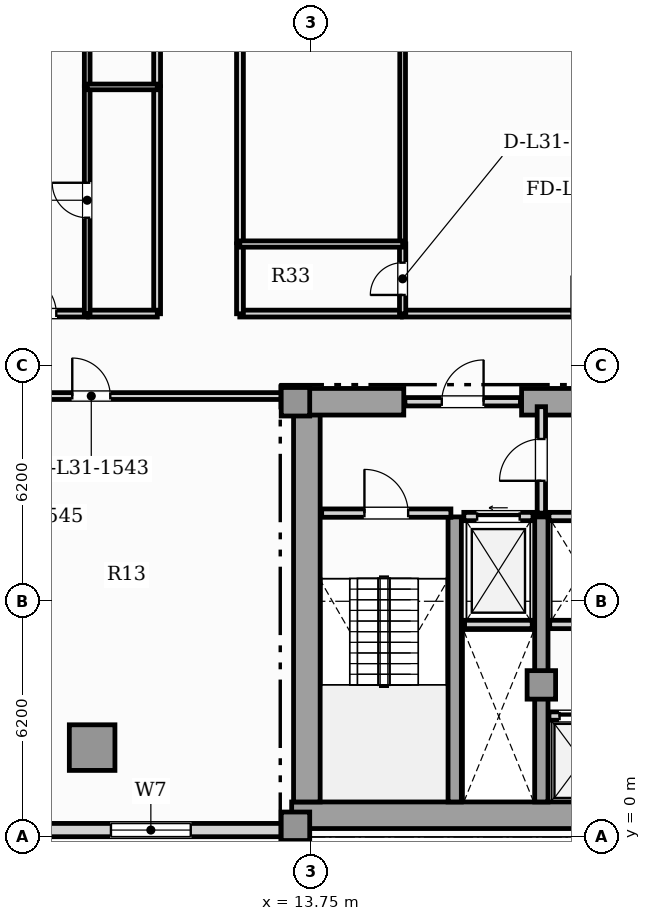
"""IFC4 building model, lengths in metres.
Left out: names, types, materials, properties, quantities, classifications, styles, units other than length and angle.
Written with IfcOpenShell. Run it as: python <this file> out.ifc"""

import sys

from ifc_helpers import new_model, si_unit, direction, frame, frame_2d, origin, origin_2d, place, context, subcontext, project, spatial, rectangle, hollow_rectangle, extrude, element, fill, save


model = new_model("IFC4")
c1 = context("Model", 3, precision=1e-05, world=origin(), true_north=direction((0.0, 1.0)))
c2 = subcontext(c1, "Body", "Model", "MODEL_VIEW")
j1 = project(units=[si_unit("LENGTHUNIT", "METRE"), si_unit("PLANEANGLEUNIT", "RADIAN")], contexts=[c1])
p1 = place(None, origin())
s1 = spatial("IfcSite", under=j1, at=p1, CompositionType="ELEMENT")
p2 = place(p1, origin())
s2 = spatial("IfcBuilding", under=s1, at=p2, CompositionType="ELEMENT")
p3 = place(p2, frame((0.0, 0.0, 127.25)))
s3 = spatial("IfcBuildingStorey", under=s2, at=p3, CompositionType="ELEMENT", Elevation=127.25)
p4 = place(p3, frame((13.25, 0.57, 0.0), z_axis=(0.0, 0.0, 1.0), x_axis=(1.0, 0.0, 0.0)))
e1 = element("IfcWall", 1, at=p4, inside=s3, PredefinedType="SHEAR", context=c2, shape_type="SweptSolid", body=[
    extrude(rectangle(XDim=31.0, YDim=0.7, at=frame_2d((15.5, 0.0))), origin(), (0.0, 0.0, 1.0), 3.6),
])
p5 = place(p3, frame((13.65, 0.92, 0.0), z_axis=(0.0, 0.0, 1.0), x_axis=(0.0, 1.0, 0.0)))
e2 = element("IfcWall", 2, at=p5, inside=s3, PredefinedType="SHEAR", context=c2, shape_type="SweptSolid", body=[
    extrude(rectangle(XDim=10.53, YDim=0.7, at=frame_2d((5.265, 0.0))), origin(), (0.0, 0.0, 1.0), 3.6),
])
p6 = place(p3, frame((13.25, 11.45, 0.0), z_axis=(0.0, 0.0, 1.0), x_axis=(1.0, 0.0, 0.0)))
e3 = element("IfcWall", 3, at=p6, inside=s3, PredefinedType="SHEAR", context=c2, shape_type="SweptSolid", body=[
    extrude(rectangle(XDim=2.95, YDim=0.7, at=frame_2d((1.475, 0.0))), origin(), (0.0, 0.0, 1.0), 3.6),
])
p7 = place(p3, frame((19.3, 11.45, 0.0), z_axis=(0.0, 0.0, 1.0), x_axis=(1.0, 0.0, 0.0)))
e4 = element("IfcWall", 4, at=p7, inside=s3, PredefinedType="SHEAR", context=c2, shape_type="SweptSolid", body=[
    extrude(rectangle(XDim=7.3, YDim=0.7, at=frame_2d((3.65, 0.0))), origin(), (0.0, 0.0, 1.0), 3.6),
])
for number, where, z_axis, x_axis in (
    (5, (17.54, 0.92, 0.0), (0.0, 0.0, 1.0), (0.0, 1.0, 0.0)),
    (6, (19.82, 0.92, 0.0), (0.0, 0.0, 1.0), (0.0, 1.0, 0.0)),
):
    element("IfcWall", number, at=place(p3, frame(where, z_axis=z_axis, x_axis=x_axis)), inside=s3, PredefinedType="SHEAR", context=c2, shape_type="SweptSolid", body=[
        extrude(rectangle(XDim=7.5, YDim=0.35, at=frame_2d((3.75, 0.0))), origin(), (0.0, 0.0, 1.0), 3.6),
    ])
for number, where, z_axis, x_axis in (
    (7, (13.35, 0.28, 0.0), (0.0, 0.0, 1.0), (1.0, 0.0, 0.0)),
    (8, (13.35, 11.45, 0.0), (0.0, 0.0, 1.0), (1.0, 0.0, 0.0)),
    (9, (19.82, 4.0, 0.0), (0.0, 0.0, 1.0), (1.0, 0.0, 0.0)),
):
    element("IfcColumn", number, at=place(p3, frame(where, z_axis=z_axis, x_axis=x_axis)), inside=s3, PredefinedType="COLUMN", context=c2, shape_type="SweptSolid", body=[
        extrude(rectangle(XDim=0.75, YDim=0.75, at=origin_2d()), origin(), (0.0, 0.0, 1.0), 3.85),
    ])
p8 = place(p3, frame((8.0, 2.35, 0.0), z_axis=(0.0, 0.0, 1.0), x_axis=(1.0, 0.0, 0.0)))
e10 = element("IfcColumn", 10, at=p8, inside=s3, PredefinedType="USERDEFINED", context=c2, shape_type="SweptSolid", body=[
    extrude(hollow_rectangle(XDim=1.2, YDim=1.2, WallThickness=0.07, at=origin_2d()), origin(), (0.0, 0.0, 1.0), 3.85),
])
p9 = place(p3, frame((5.84, 0.18, 0.0), z_axis=(0.0, 0.0, 1.0), x_axis=(1.0, 0.0, 0.0)))
e11 = element("IfcWall", 11, at=p9, inside=s3, PredefinedType="SOLIDWALL", context=c2, shape_type="SweptSolid", body=[
    extrude(rectangle(XDim=7.41, YDim=0.35, at=frame_2d((3.705, 0.0))), origin(), (0.0, 0.0, 1.0), 3.6),
])
p10 = place(p9, frame((2.655, 0.0, 0.85)))
e12 = element("IfcOpeningElement", 12, at=p10, cuts=e11, PredefinedType="OPENING", context=c2, shape_type="SweptSolid", body=[
    extrude(rectangle(XDim=2.1, YDim=2.05, at=frame_2d((1.05, 1.025))), frame((0.0, 0.185, 0.0), z_axis=(0.0, -1.0, 0.0), x_axis=(1.0, 0.0, 0.0)), (0.0, 0.0, 1.0), 0.37),
])
p11 = place(p3, frame((17.8, 5.59, 0.0), z_axis=(0.0, 0.0, 1.0), x_axis=(1.0, 0.0, 0.0)))
e13 = element("IfcWall", 13, at=p11, inside=s3, PredefinedType="SOLIDWALL", context=c2, shape_type="SweptSolid", body=[
    extrude(rectangle(XDim=1.78, YDim=0.22, at=frame_2d((0.89, 0.0))), origin(), (0.0, 0.0, 1.0), 3.6),
])
p12 = place(p3, frame((17.78, 8.43, 0.0), z_axis=(0.0, 0.0, 1.0), x_axis=(1.0, 0.0, 0.0)))
e14 = element("IfcWall", 14, at=p12, inside=s3, PredefinedType="SOLIDWALL", context=c2, shape_type="SweptSolid", body=[
    extrude(rectangle(XDim=1.82, YDim=0.22, at=frame_2d((0.91, 0.0))), origin(), (0.0, 0.0, 1.0), 3.6),
])
p13 = place(p12, frame((0.35, 0.0, 0.0)))
e15 = element("IfcOpeningElement", 15, at=p13, cuts=e14, PredefinedType="OPENING", context=c2, shape_type="SweptSolid", body=[
    extrude(rectangle(XDim=1.12, YDim=2.25, at=frame_2d((0.56, 1.125))), frame((0.0, 0.12, 0.0), z_axis=(0.0, -1.0, 0.0), x_axis=(1.0, 0.0, 0.0)), (0.0, 0.0, 1.0), 0.24),
])
p14 = place(p3, frame((20.02, 3.18, 0.0), z_axis=(0.0, 0.0, 1.0), x_axis=(1.0, 0.0, 0.0)))
e16 = element("IfcWall", 16, at=p14, inside=s3, PredefinedType="SOLIDWALL", context=c2, shape_type="SweptSolid", body=[
    extrude(rectangle(XDim=1.74, YDim=0.22, at=frame_2d((0.87, 0.0))), origin(), (0.0, 0.0, 1.0), 3.6),
])
p15 = place(p14, frame((0.28, 0.0, 0.0)))
e17 = element("IfcOpeningElement", 17, at=p15, cuts=e16, PredefinedType="OPENING", context=c2, shape_type="SweptSolid", body=[
    extrude(rectangle(XDim=1.18, YDim=2.2, at=frame_2d((0.59, 1.1))), frame((0.0, 0.12, 0.0), z_axis=(0.0, -1.0, 0.0), x_axis=(1.0, 0.0, 0.0)), (0.0, 0.0, 1.0), 0.24),
])
p16 = place(p3, frame((20.04, 5.59, 0.0), z_axis=(0.0, 0.0, 1.0), x_axis=(1.0, 0.0, 0.0)))
e18 = element("IfcWall", 18, at=p16, inside=s3, PredefinedType="SOLIDWALL", context=c2, shape_type="SweptSolid", body=[
    extrude(rectangle(XDim=1.7, YDim=0.22, at=frame_2d((0.85, 0.0))), origin(), (0.0, 0.0, 1.0), 3.6),
])
p17 = place(p3, frame((20.02, 8.43, 0.0), z_axis=(0.0, 0.0, 1.0), x_axis=(1.0, 0.0, 0.0)))
e19 = element("IfcWall", 19, at=p17, inside=s3, PredefinedType="SOLIDWALL", context=c2, shape_type="SweptSolid", body=[
    extrude(rectangle(XDim=1.74, YDim=0.22, at=frame_2d((0.87, 0.0))), origin(), (0.0, 0.0, 1.0), 3.6),
])
p18 = place(p3, frame((14.04, 8.52, 0.0), z_axis=(0.0, 0.0, 1.0), x_axis=(1.0, 0.0, 0.0)))
e20 = element("IfcWall", 20, at=p18, inside=s3, PredefinedType="SOLIDWALL", context=c2, shape_type="SweptSolid", body=[
    extrude(rectangle(XDim=3.4, YDim=0.22, at=frame_2d((1.7, 0.0))), origin(), (0.0, 0.0, 1.0), 3.6),
])
p19 = place(p18, frame((1.125, 0.0, 0.0)))
e21 = element("IfcOpeningElement", 21, at=p19, cuts=e20, PredefinedType="OPENING", context=c2, shape_type="SweptSolid", body=[
    extrude(rectangle(XDim=1.15, YDim=2.2, at=frame_2d((0.575, 1.1))), frame((0.0, 0.12, 0.0), z_axis=(0.0, -1.0, 0.0), x_axis=(1.0, 0.0, 0.0)), (0.0, 0.0, 1.0), 0.24),
])
p20 = place(p3, frame((19.82, 8.52, 0.0), z_axis=(0.0, 0.0, 1.0), x_axis=(0.0, 1.0, 0.0)))
e22 = element("IfcWall", 22, at=p20, inside=s3, PredefinedType="SOLIDWALL", context=c2, shape_type="SweptSolid", body=[
    extrude(rectangle(XDim=2.8, YDim=0.22, at=frame_2d((1.4, 0.0))), origin(), (0.0, 0.0, 1.0), 3.055),
])
p21 = place(p20, frame((0.85, 0.0, 0.0)))
e23 = element("IfcOpeningElement", 23, at=p21, cuts=e22, PredefinedType="OPENING", context=c2, shape_type="SweptSolid", body=[
    extrude(rectangle(XDim=1.1, YDim=2.2, at=frame_2d((0.55, 1.1))), frame((0.0, 0.12, 0.0), z_axis=(0.0, -1.0, 0.0), x_axis=(1.0, 0.0, 0.0)), (0.0, 0.0, 1.0), 0.24),
])
p22 = place(p3, frame((16.23, 11.45, 0.0), z_axis=(0.0, 0.0, 1.0), x_axis=(1.0, 0.0, 0.0)))
e24 = element("IfcWall", 24, at=p22, inside=s3, PredefinedType="SOLIDWALL", context=c2, shape_type="SweptSolid", body=[
    extrude(rectangle(XDim=3.04, YDim=0.22, at=frame_2d((1.52, 0.0))), origin(), (0.0, 0.0, 1.0), 3.6),
])
p23 = place(p22, frame((0.97, 0.0, 0.0)))
e25 = element("IfcOpeningElement", 25, at=p23, cuts=e24, PredefinedType="OPENING", context=c2, shape_type="SweptSolid", body=[
    extrude(rectangle(XDim=1.1, YDim=2.2, at=frame_2d((0.55, 1.1))), frame((0.0, 0.12, 0.0), z_axis=(0.0, -1.0, 0.0), x_axis=(1.0, 0.0, 0.0)), (0.0, 0.0, 1.0), 0.24),
])
p24 = place(p3, frame((2.81, 11.6, 0.0), z_axis=(0.0, 0.0, 1.0), x_axis=(1.0, 0.0, 0.0)))
e26 = element("IfcWall", 26, at=p24, inside=s3, PredefinedType="PARTITIONING", context=c2, shape_type="SweptSolid", body=[
    extrude(rectangle(XDim=10.335, YDim=0.18, at=frame_2d((5.167, 0.0))), origin(), (0.0, 0.0, 1.0), 3.6),
])
p25 = place(p24, frame((4.667, 0.0, 0.0)))
e27 = element("IfcOpeningElement", 27, at=p25, cuts=e26, PredefinedType="OPENING", context=c2, shape_type="SweptSolid", body=[
    extrude(rectangle(XDim=1.0, YDim=2.15, at=frame_2d((0.5, 1.075))), frame((0.0, 0.1, 0.0), z_axis=(0.0, -1.0, 0.0), x_axis=(1.0, 0.0, 0.0)), (0.0, 0.0, 1.0), 0.2),
])
p26 = place(p3, frame((5.239, 13.77, 0.0), z_axis=(0.0, 0.0, 1.0), x_axis=(1.0, 0.0, 0.0)))
e28 = element("IfcWall", 28, at=p26, inside=s3, PredefinedType="PARTITIONING", context=c2, shape_type="SweptSolid", body=[
    extrude(rectangle(XDim=2.636, YDim=0.18, at=frame_2d((1.318, 0.0))), origin(), (0.0, 0.0, 1.0), 3.6),
])
p27 = place(p26, frame((0.818, 0.0, 0.0)))
e29 = element("IfcOpeningElement", 29, at=p27, cuts=e28, PredefinedType="OPENING", context=c2, shape_type="SweptSolid", body=[
    extrude(rectangle(XDim=1.0, YDim=2.15, at=frame_2d((0.5, 1.075))), frame((0.0, 0.1, 0.0), z_axis=(0.0, -1.0, 0.0), x_axis=(1.0, 0.0, 0.0)), (0.0, 0.0, 1.0), 0.2),
])
p28 = place(p3, frame((9.71, 13.765, 0.0), z_axis=(0.0, 0.0, 1.0), x_axis=(0.0, 1.0, 0.0)))
e30 = element("IfcWall", 30, at=p28, inside=s3, PredefinedType="PARTITIONING", context=c2, shape_type="SweptSolid", body=[
    extrude(rectangle(XDim=5.974, YDim=0.18, at=frame_2d((2.987, 0.0))), origin(), (0.0, 0.0, 1.0), 3.6),
])
p29 = place(p3, frame((7.905, 13.77, 0.0), z_axis=(0.0, 0.0, 1.0), x_axis=(1.0, 0.0, 0.0)))
e31 = element("IfcWall", 31, at=p29, inside=s3, PredefinedType="PARTITIONING", context=c2, shape_type="SweptSolid", body=[
    extrude(rectangle(XDim=1.81, YDim=0.18, at=frame_2d((0.905, 0.0))), origin(), (0.0, 0.0, 1.0), 3.6),
])
p30 = place(p3, frame((9.71, 19.769, 0.0), z_axis=(0.0, 0.0, 1.0), x_axis=(0.0, 1.0, 0.0)))
e32 = element("IfcWall", 32, at=p30, inside=s3, PredefinedType="PARTITIONING", context=c2, shape_type="SweptSolid", body=[
    extrude(rectangle(XDim=8.126, YDim=0.18, at=frame_2d((4.063, 0.0))), origin(), (0.0, 0.0, 1.0), 3.6),
])
p31 = place(p3, frame((16.165, 13.77, 0.0), z_axis=(0.0, 0.0, 1.0), x_axis=(1.0, 0.0, 0.0)))
e33 = element("IfcWall", 33, at=p31, inside=s3, PredefinedType="PARTITIONING", context=c2, shape_type="SweptSolid", body=[
    extrude(rectangle(XDim=9.9, YDim=0.18, at=frame_2d((4.95, 0.0))), origin(), (0.0, 0.0, 1.0), 3.6),
])
p32 = place(p31, frame((4.45, 0.0, 0.0)))
e34 = element("IfcOpeningElement", 34, at=p32, cuts=e33, PredefinedType="OPENING", context=c2, shape_type="SweptSolid", body=[
    extrude(rectangle(XDim=1.0, YDim=2.15, at=frame_2d((0.5, 1.075))), frame((0.0, 0.1, 0.0), z_axis=(0.0, -1.0, 0.0), x_axis=(1.0, 0.0, 0.0)), (0.0, 0.0, 1.0), 0.2),
])
p33 = place(p3, frame((11.885, 13.77, 0.0), z_axis=(0.0, 0.0, 1.0), x_axis=(1.0, 0.0, 0.0)))
e35 = element("IfcWall", 35, at=p33, inside=s3, PredefinedType="PARTITIONING", context=c2, shape_type="SweptSolid", body=[
    extrude(rectangle(XDim=4.25, YDim=0.18, at=frame_2d((2.125, 0.0))), origin(), (0.0, 0.0, 1.0), 3.6),
])
p34 = place(p3, frame((11.89, 13.765, 0.0), z_axis=(0.0, 0.0, 1.0), x_axis=(0.0, 1.0, 0.0)))
e36 = element("IfcWall", 36, at=p34, inside=s3, PredefinedType="PARTITIONING", context=c2, shape_type="SweptSolid", body=[
    extrude(rectangle(XDim=1.84, YDim=0.18, at=frame_2d((0.92, 0.0))), origin(), (0.0, 0.0, 1.0), 3.6),
])
p35 = place(p3, frame((11.89, 15.635, 0.0), z_axis=(0.0, 0.0, 1.0), x_axis=(0.0, 1.0, 0.0)))
e37 = element("IfcWall", 37, at=p35, inside=s3, PredefinedType="PARTITIONING", context=c2, shape_type="SweptSolid", body=[
    extrude(rectangle(XDim=12.26, YDim=0.18, at=frame_2d((6.13, 0.0))), origin(), (0.0, 0.0, 1.0), 3.6),
])
p36 = place(p3, frame((7.87, 13.765, 0.0), z_axis=(0.0, 0.0, 1.0), x_axis=(0.0, 1.0, 0.0)))
e38 = element("IfcWall", 38, at=p36, inside=s3, PredefinedType="PARTITIONING", context=c2, shape_type="SweptSolid", body=[
    extrude(rectangle(XDim=5.974, YDim=0.15, at=frame_2d((2.987, 0.0))), origin(), (0.0, 0.0, 1.0), 3.055),
])
p37 = place(p36, frame((2.527, 0.0, 0.0)))
e39 = element("IfcOpeningElement", 39, at=p37, cuts=e38, PredefinedType="OPENING", context=c2, shape_type="SweptSolid", body=[
    extrude(rectangle(XDim=0.92, YDim=2.1, at=frame_2d((0.46, 1.05))), frame((0.0, 0.085, 0.0), z_axis=(0.0, -1.0, 0.0), x_axis=(1.0, 0.0, 0.0)), (0.0, 0.0, 1.0), 0.17),
])
p38 = place(p3, frame((7.87, 19.769, 0.0), z_axis=(0.0, 0.0, 1.0), x_axis=(0.0, 1.0, 0.0)))
e40 = element("IfcWall", 40, at=p38, inside=s3, PredefinedType="PARTITIONING", context=c2, shape_type="SweptSolid", body=[
    extrude(rectangle(XDim=13.736, YDim=0.15, at=frame_2d((6.868, 0.0))), origin(), (0.0, 0.0, 1.0), 3.055),
])
p39 = place(p38, frame((6.408, 0.0, 0.0)))
e41 = element("IfcOpeningElement", 41, at=p39, cuts=e40, PredefinedType="OPENING", context=c2, shape_type="SweptSolid", body=[
    extrude(rectangle(XDim=0.92, YDim=2.1, at=frame_2d((0.46, 1.05))), frame((0.0, 0.085, 0.0), z_axis=(0.0, -1.0, 0.0), x_axis=(1.0, 0.0, 0.0)), (0.0, 0.0, 1.0), 0.17),
])
p40 = place(p3, frame((7.865, 19.734, 0.0), z_axis=(0.0, 0.0, 1.0), x_axis=(1.0, 0.0, 0.0)))
e42 = element("IfcWall", 42, at=p40, inside=s3, PredefinedType="PARTITIONING", context=c2, shape_type="SweptSolid", body=[
    extrude(rectangle(XDim=1.85, YDim=0.15, at=frame_2d((0.925, 0.0))), origin(), (0.0, 0.0, 1.0), 3.6),
])
p41 = place(p3, frame((16.17, 13.765, 0.0), z_axis=(0.0, 0.0, 1.0), x_axis=(0.0, 1.0, 0.0)))
e43 = element("IfcWall", 43, at=p41, inside=s3, PredefinedType="PLUMBINGWALL", context=c2, shape_type="SweptSolid", body=[
    extrude(rectangle(XDim=1.84, YDim=0.165, at=frame_2d((0.92, 0.0))), origin(), (0.0, 0.0, 1.0), 3.6),
])
p42 = place(p41, frame((0.495, 0.0, 0.0)))
e44 = element("IfcOpeningElement", 44, at=p42, cuts=e43, PredefinedType="OPENING", context=c2, shape_type="SweptSolid", body=[
    extrude(rectangle(XDim=0.85, YDim=2.1, at=frame_2d((0.425, 1.05))), frame((0.0, 0.093, 0.0), z_axis=(0.0, -1.0, 0.0), x_axis=(1.0, 0.0, 0.0)), (0.0, 0.0, 1.0), 0.185),
])
p43 = place(p3, frame((16.17, 15.635, 0.0), z_axis=(0.0, 0.0, 1.0), x_axis=(0.0, 1.0, 0.0)))
e45 = element("IfcWall", 45, at=p43, inside=s3, PredefinedType="PARTITIONING", context=c2, shape_type="SweptSolid", body=[
    extrude(rectangle(XDim=17.87, YDim=0.15, at=frame_2d((8.935, 0.0))), origin(), (0.0, 0.0, 1.0), 3.6),
])
p44 = place(p43, frame((8.475, 0.0, 0.0)))
e46 = element("IfcOpeningElement", 46, at=p44, cuts=e45, PredefinedType="OPENING", context=c2, shape_type="SweptSolid", body=[
    extrude(rectangle(XDim=0.92, YDim=2.1, at=frame_2d((0.46, 1.05))), frame((0.0, 0.085, 0.0), z_axis=(0.0, -1.0, 0.0), x_axis=(1.0, 0.0, 0.0)), (0.0, 0.0, 1.0), 0.17),
])
p45 = place(p3, frame((11.885, 15.6, 0.0), z_axis=(0.0, 0.0, 1.0), x_axis=(1.0, 0.0, 0.0)))
e47 = element("IfcWall", 47, at=p45, inside=s3, PredefinedType="PLUMBINGWALL", context=c2, shape_type="SweptSolid", body=[
    extrude(rectangle(XDim=4.29, YDim=0.165, at=frame_2d((2.145, 0.0))), origin(), (0.0, 0.0, 1.0), 3.6),
])
p46 = place(p10, origin())
e48 = element("IfcWindow", 48, at=p46, inside=s3, PartitioningType="SINGLE_PANEL", PredefinedType="WINDOW", context=c2, shape_type="SweptSolid", body=[
    extrude(rectangle(XDim=2.1, YDim=2.05, at=frame_2d((1.05, 1.025))), frame((0.0, 0.03, 0.0), z_axis=(0.0, -1.0, 0.0), x_axis=(1.0, 0.0, 0.0)), (0.0, 0.0, 1.0), 0.06),
])
fill(e12, e48)
p47 = place(p13, origin())
e49 = element("IfcDoor", 49, at=p47, inside=s3, OperationType="SLIDING_TO_LEFT", PredefinedType="DOOR", context=c2, shape_type="SweptSolid", body=[
    extrude(rectangle(XDim=1.12, YDim=2.25, at=frame_2d((0.56, 1.125))), frame((0.0, 0.025, 0.0), z_axis=(0.0, -1.0, 0.0), x_axis=(1.0, 0.0, 0.0)), (0.0, 0.0, 1.0), 0.05),
])
fill(e15, e49)
p48 = place(p15, origin())
e50 = element("IfcDoor", 50, at=p48, inside=s3, OperationType="SLIDING_TO_RIGHT", PredefinedType="DOOR", context=c2, shape_type="SweptSolid", body=[
    extrude(rectangle(XDim=1.18, YDim=2.2, at=frame_2d((0.59, 1.1))), frame((0.0, 0.025, 0.0), z_axis=(0.0, -1.0, 0.0), x_axis=(1.0, 0.0, 0.0)), (0.0, 0.0, 1.0), 0.05),
])
fill(e17, e50)
p49 = place(p19, origin())
e51 = element("IfcDoor", 51, at=p49, inside=s3, OperationType="SINGLE_SWING_LEFT", PredefinedType="DOOR", context=c2, shape_type="SweptSolid", body=[
    extrude(rectangle(XDim=1.15, YDim=2.2, at=frame_2d((0.575, 1.1))), frame((0.0, 0.025, 0.0), z_axis=(0.0, -1.0, 0.0), x_axis=(1.0, 0.0, 0.0)), (0.0, 0.0, 1.0), 0.05),
])
fill(e21, e51)
p50 = place(p21, origin())
e52 = element("IfcDoor", 52, at=p50, inside=s3, OperationType="SINGLE_SWING_LEFT", PredefinedType="DOOR", context=c2, shape_type="SweptSolid", body=[
    extrude(rectangle(XDim=1.1, YDim=2.2, at=frame_2d((0.55, 1.1))), frame((0.0, 0.025, 0.0), z_axis=(0.0, -1.0, 0.0), x_axis=(1.0, 0.0, 0.0)), (0.0, 0.0, 1.0), 0.05),
])
fill(e23, e52)
p51 = place(p23, origin())
e53 = element("IfcDoor", 53, at=p51, inside=s3, OperationType="SINGLE_SWING_RIGHT", PredefinedType="DOOR", context=c2, shape_type="SweptSolid", body=[
    extrude(rectangle(XDim=1.1, YDim=2.2, at=frame_2d((0.55, 1.1))), frame((0.0, 0.025, 0.0), z_axis=(0.0, -1.0, 0.0), x_axis=(1.0, 0.0, 0.0)), (0.0, 0.0, 1.0), 0.05),
])
fill(e25, e53)
p52 = place(p25, origin())
e54 = element("IfcDoor", 54, at=p52, inside=s3, OperationType="SINGLE_SWING_LEFT", PredefinedType="DOOR", context=c2, shape_type="SweptSolid", body=[
    extrude(rectangle(XDim=1.0, YDim=2.15, at=frame_2d((0.5, 1.075))), frame((0.0, 0.025, 0.0), z_axis=(0.0, -1.0, 0.0), x_axis=(1.0, 0.0, 0.0)), (0.0, 0.0, 1.0), 0.05),
])
fill(e27, e54)
p53 = place(p27, origin())
e55 = element("IfcDoor", 55, at=p53, inside=s3, OperationType="SINGLE_SWING_LEFT", PredefinedType="DOOR", context=c2, shape_type="SweptSolid", body=[
    extrude(rectangle(XDim=1.0, YDim=2.15, at=frame_2d((0.5, 1.075))), frame((0.0, 0.025, 0.0), z_axis=(0.0, -1.0, 0.0), x_axis=(1.0, 0.0, 0.0)), (0.0, 0.0, 1.0), 0.05),
])
fill(e29, e55)
p54 = place(p32, origin())
e56 = element("IfcDoor", 56, at=p54, inside=s3, OperationType="SINGLE_SWING_LEFT", PredefinedType="DOOR", context=c2, shape_type="SweptSolid", body=[
    extrude(rectangle(XDim=1.0, YDim=2.15, at=frame_2d((0.5, 1.075))), frame((0.0, 0.025, 0.0), z_axis=(0.0, -1.0, 0.0), x_axis=(1.0, 0.0, 0.0)), (0.0, 0.0, 1.0), 0.05),
])
fill(e34, e56)
p55 = place(p37, origin())
e57 = element("IfcDoor", 57, at=p55, inside=s3, OperationType="SINGLE_SWING_RIGHT", PredefinedType="DOOR", context=c2, shape_type="SweptSolid", body=[
    extrude(rectangle(XDim=0.92, YDim=2.1, at=frame_2d((0.46, 1.05))), frame((0.0, 0.025, 0.0), z_axis=(0.0, -1.0, 0.0), x_axis=(1.0, 0.0, 0.0)), (0.0, 0.0, 1.0), 0.05),
])
fill(e39, e57)
p56 = place(p42, origin())
e58 = element("IfcDoor", 58, at=p56, inside=s3, OperationType="SINGLE_SWING_LEFT", PredefinedType="DOOR", context=c2, shape_type="SweptSolid", body=[
    extrude(rectangle(XDim=0.85, YDim=2.1, at=frame_2d((0.425, 1.05))), frame((0.0, 0.025, 0.0), z_axis=(0.0, -1.0, 0.0), x_axis=(1.0, 0.0, 0.0)), (0.0, 0.0, 1.0), 0.05),
])
fill(e44, e58)
save(model, sys.argv[1])
